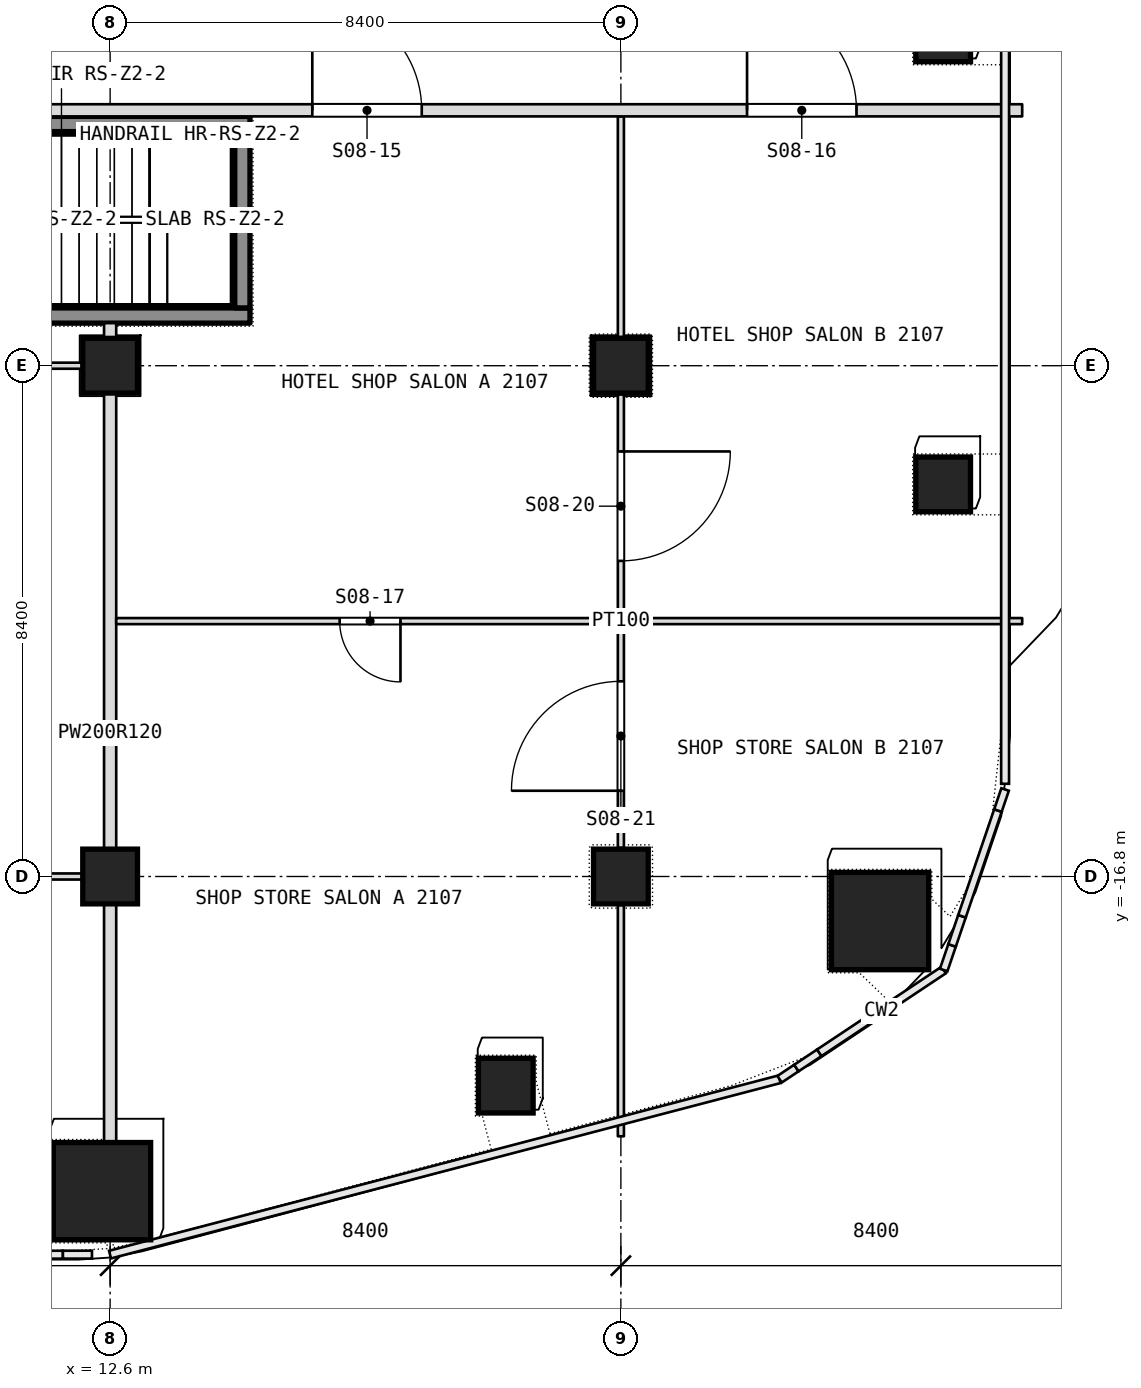
"""IFC4 building model, lengths in metres.
Left out: names, types, materials, properties, quantities, classifications, styles, units other than length and angle.
Written with IfcOpenShell. Run it as: python <this file> out.ifc"""

import sys

from ifc_helpers import new_model, si_unit, direction, frame, frame_2d, origin, origin_2d, place, context, subcontext, project, spatial, rectangle, extrude, element, fill, save


model = new_model("IFC4")
c1 = context("Model", 3, precision=1e-05, world=origin(), true_north=direction((0.0, 1.0)))
c2 = subcontext(c1, "Body", "Model", "MODEL_VIEW")
j1 = project(units=[si_unit("LENGTHUNIT", "METRE"), si_unit("PLANEANGLEUNIT", "RADIAN")], contexts=[c1])
p1 = place(None, origin())
s1 = spatial("IfcSite", under=j1, at=p1, CompositionType="ELEMENT")
p2 = place(p1, origin())
s2 = spatial("IfcBuilding", under=s1, at=p2, CompositionType="ELEMENT")
p3 = place(p2, frame((0.0, 0.0, 97.7)))
s3 = spatial("IfcBuildingStorey", under=s2, at=p3, CompositionType="ELEMENT", Elevation=97.7)
for number, where, z_axis, x_axis in (
    (1, (12.466, -21.975, 0.0), (0.0, 0.0, 1.0), (1.0, 0.0, 0.0)),
    (2, (25.263, -17.533, 0.0), (0.0, 0.0, 1.0), (1.0, 0.0, 0.0)),
):
    element("IfcColumn", number, at=place(p3, frame(where, z_axis=z_axis, x_axis=x_axis)), inside=s3, PredefinedType="COLUMN", context=c2, shape_type="SweptSolid", body=[
        extrude(rectangle(XDim=1.6, YDim=1.6, at=origin_2d()), origin(), (0.0, 0.0, 1.0), 7.2),
    ])
p4 = place(p3, frame((12.6, -16.8, -0.26), z_axis=(0.0, 0.0, 1.0), x_axis=(1.0, 0.0, 0.0)))
e3 = element("IfcColumn", 3, at=p4, inside=s3, PredefinedType="COLUMN", context=c2, shape_type="SweptSolid", body=[
    extrude(rectangle(XDim=0.9, YDim=0.9, at=origin_2d()), origin(), (0.0, 0.0, 1.0), 7.46),
])
p5 = place(p3, frame((12.6, -8.4, 0.0), z_axis=(0.0, 0.0, 1.0), x_axis=(1.0, 0.0, 0.0)))
e4 = element("IfcColumn", 4, at=p5, inside=s3, PredefinedType="COLUMN", context=c2, shape_type="SweptSolid", body=[
    extrude(rectangle(XDim=0.9, YDim=0.9, at=origin_2d()), origin(), (0.0, 0.0, 1.0), 7.2),
])
p6 = place(p3, frame((21.0, -16.8, -0.26), z_axis=(0.0, 0.0, 1.0), x_axis=(1.0, 0.0, 0.0)))
e5 = element("IfcColumn", 5, at=p6, inside=s3, PredefinedType="COLUMN", context=c2, shape_type="SweptSolid", body=[
    extrude(rectangle(XDim=0.9, YDim=0.9, at=origin_2d()), origin(), (0.0, 0.0, 1.0), 7.46),
])
for number, where, z_axis, x_axis in (
    (6, (21.0, -8.4, 0.0), (0.0, 0.0, 1.0), (1.0, 0.0, 0.0)),
    (7, (26.3, -2.951, 0.0), (0.0, 0.0, 1.0), (1.0, 0.0, 0.0)),
    (8, (26.3, -10.352, 0.0), (0.0, 0.0, 1.0), (1.0, 0.0, 0.0)),
    (9, (19.107, -20.239, 0.0), (0.0, 0.0, 1.0), (1.0, 0.0, 0.0)),
):
    element("IfcColumn", number, at=place(p3, frame(where, z_axis=z_axis, x_axis=x_axis)), inside=s3, PredefinedType="COLUMN", context=c2, shape_type="SweptSolid", body=[
        extrude(rectangle(XDim=0.9, YDim=0.9, at=origin_2d()), origin(), (0.0, 0.0, 1.0), 7.2),
    ])
p7 = place(p3, frame((21.0, -21.072, 0.0), z_axis=(0.0, 0.0, 1.0), x_axis=(0.0, 1.0, 0.0)))
e10 = element("IfcWall", 10, at=p7, inside=s3, PredefinedType="PARTITIONING", context=c2, shape_type="SweptSolid", body=[
    extrude(rectangle(XDim=3.802, YDim=0.1, at=frame_2d((1.901, 0.0))), origin(), (0.0, 0.0, 1.0), 6.94),
])
p8 = place(p3, frame((21.0, -16.33, 0.0), z_axis=(0.0, 0.0, 1.0), x_axis=(0.0, 1.0, 0.0)))
e11 = element("IfcWall", 11, at=p8, inside=s3, PredefinedType="PARTITIONING", context=c2, shape_type="SweptSolid", body=[
    extrude(rectangle(XDim=7.46, YDim=0.1, at=frame_2d((3.73, 0.0))), origin(), (0.0, 0.0, 1.0), 6.94),
])
p9 = place(p8, frame((4.72, 0.0, 0.0)))
e12 = element("IfcOpeningElement", 12, at=p9, cuts=e11, PredefinedType="OPENING", context=c2, shape_type="SweptSolid", body=[
    extrude(rectangle(XDim=1.8, YDim=2.1, at=frame_2d((0.9, 1.05))), frame((0.0, 0.05, 0.0), z_axis=(0.0, -1.0, 0.0), x_axis=(1.0, 0.0, 0.0)), (0.0, 0.0, 1.0), 0.1),
])
p10 = place(p8, frame((0.94, 0.0, 0.0)))
e13 = element("IfcOpeningElement", 13, at=p10, cuts=e11, PredefinedType="OPENING", context=c2, shape_type="SweptSolid", body=[
    extrude(rectangle(XDim=1.8, YDim=2.1, at=frame_2d((0.9, 1.05))), frame((0.0, 0.05, 0.0), z_axis=(0.0, -1.0, 0.0), x_axis=(1.0, 0.0, 0.0)), (0.0, 0.0, 1.0), 0.1),
])
p11 = place(p3, frame((21.0, -7.93, 0.0), z_axis=(0.0, 0.0, 1.0), x_axis=(0.0, 1.0, 0.0)))
e14 = element("IfcWall", 14, at=p11, inside=s3, PredefinedType="PARTITIONING", context=c2, shape_type="SweptSolid", body=[
    extrude(rectangle(XDim=3.63, YDim=0.1, at=frame_2d((1.815, 0.0))), origin(), (0.0, 0.0, 1.0), 6.94),
])
p12 = place(p3, frame((-24.463, -16.8, 0.0), z_axis=(0.0, 0.0, 1.0), x_axis=(1.0, 0.0, 0.0)))
e15 = element("IfcWall", 15, at=p12, inside=s3, PredefinedType="PARTITIONING", context=c2, shape_type="SweptSolid", body=[
    extrude(rectangle(XDim=37.163, YDim=0.1, at=frame_2d((18.582, 0.0))), origin(), (0.0, 0.0, 1.0), 6.49),
])
p13 = place(p12, frame((7.038, 0.0, 0.0)))
e16 = element("IfcOpeningElement", 16, at=p13, cuts=e15, PredefinedType="OPENING", context=c2, shape_type="SweptSolid", body=[
    extrude(rectangle(XDim=1.2, YDim=2.1, at=frame_2d((0.6, 1.05))), frame((0.0, 0.05, 0.0), z_axis=(0.0, -1.0, 0.0), x_axis=(1.0, 0.0, 0.0)), (0.0, 0.0, 1.0), 0.1),
])
p14 = place(p12, frame((24.063, 0.0, 0.0)))
e17 = element("IfcOpeningElement", 17, at=p14, cuts=e15, PredefinedType="OPENING", context=c2, shape_type="SweptSolid", body=[
    extrude(rectangle(XDim=1.0, YDim=2.1, at=frame_2d((0.5, 1.05))), frame((0.0, 0.05, 0.0), z_axis=(0.0, -1.0, 0.0), x_axis=(1.0, 0.0, 0.0)), (0.0, 0.0, 1.0), 0.1),
])
p15 = place(p3, frame((12.6, -21.175, 0.0), z_axis=(0.0, 0.0, 1.0), x_axis=(0.0, 1.0, 0.0)))
e18 = element("IfcWall", 18, at=p15, inside=s3, PredefinedType="PARTITIONING", context=c2, shape_type="SweptSolid", body=[
    extrude(rectangle(XDim=13.475, YDim=0.2, at=frame_2d((6.738, 0.0))), origin(), (0.0, 0.0, 1.0), 6.94),
])
p16 = place(p3, frame((12.7, -12.6, 0.0), z_axis=(0.0, 0.0, 1.0), x_axis=(1.0, 0.0, 0.0)))
e19 = element("IfcWall", 19, at=p16, inside=s3, PredefinedType="PARTITIONING", context=c2, shape_type="SweptSolid", body=[
    extrude(rectangle(XDim=14.9, YDim=0.1, at=frame_2d((7.45, 0.0))), origin(), (0.0, 0.0, 1.0), 6.94),
])
p17 = place(p16, frame((3.675, 0.0, 0.0)))
e20 = element("IfcOpeningElement", 20, at=p17, cuts=e19, PredefinedType="OPENING", context=c2, shape_type="SweptSolid", body=[
    extrude(rectangle(XDim=1.0, YDim=2.1, at=frame_2d((0.5, 1.05))), frame((0.0, 0.05, 0.0), z_axis=(0.0, -1.0, 0.0), x_axis=(1.0, 0.0, 0.0)), (0.0, 0.0, 1.0), 0.1),
])
p18 = place(p3, frame((4.67, -8.4, 0.0), z_axis=(0.0, 0.0, 1.0), x_axis=(1.0, 0.0, 0.0)))
e21 = element("IfcWall", 21, at=p18, inside=s3, PredefinedType="PARTITIONING", context=c2, shape_type="SweptSolid", body=[
    extrude(rectangle(XDim=7.83, YDim=0.1, at=frame_2d((3.915, 0.0))), origin(), (0.0, 0.0, 1.0), 6.49),
])
p19 = place(p3, frame((-27.6, -4.2, 0.0), z_axis=(0.0, 0.0, 1.0), x_axis=(1.0, 0.0, 0.0)))
e22 = element("IfcWall", 22, at=p19, inside=s3, PredefinedType="PARTITIONING", context=c2, shape_type="SweptSolid", body=[
    extrude(rectangle(XDim=55.2, YDim=0.2, at=frame_2d((27.6, 0.0))), origin(), (0.0, 0.0, 1.0), 6.94),
])
p20 = place(p19, frame((9.925, 0.0, 0.0)))
e23 = element("IfcOpeningElement", 23, at=p20, cuts=e22, PredefinedType="OPENING", context=c2, shape_type="SweptSolid", body=[
    extrude(rectangle(XDim=1.8, YDim=2.1, at=frame_2d((0.9, 1.05))), frame((0.0, 0.1, 0.0), z_axis=(0.0, -1.0, 0.0), x_axis=(1.0, 0.0, 0.0)), (0.0, 0.0, 1.0), 0.2),
])
p21 = place(p19, frame((2.725, 0.0, 0.0)))
e24 = element("IfcOpeningElement", 24, at=p21, cuts=e22, PredefinedType="OPENING", context=c2, shape_type="SweptSolid", body=[
    extrude(rectangle(XDim=1.8, YDim=2.1, at=frame_2d((0.9, 1.05))), frame((0.0, 0.1, 0.0), z_axis=(0.0, -1.0, 0.0), x_axis=(1.0, 0.0, 0.0)), (0.0, 0.0, 1.0), 0.2),
])
p22 = place(p19, frame((26.65, 0.0, 0.0)))
e25 = element("IfcOpeningElement", 25, at=p22, cuts=e22, PredefinedType="OPENING", context=c2, shape_type="SweptSolid", body=[
    extrude(rectangle(XDim=1.8, YDim=2.1, at=frame_2d((0.9, 1.05))), frame((0.0, 0.1, 0.0), z_axis=(0.0, -1.0, 0.0), x_axis=(1.0, 0.0, 0.0)), (0.0, 0.0, 1.0), 0.2),
])
p23 = place(p19, frame((43.525, 0.0, 0.0)))
e26 = element("IfcOpeningElement", 26, at=p23, cuts=e22, PredefinedType="OPENING", context=c2, shape_type="SweptSolid", body=[
    extrude(rectangle(XDim=1.8, YDim=2.1, at=frame_2d((0.9, 1.05))), frame((0.0, 0.1, 0.0), z_axis=(0.0, -1.0, 0.0), x_axis=(1.0, 0.0, 0.0)), (0.0, 0.0, 1.0), 0.2),
])
p24 = place(p19, frame((50.675, 0.0, 0.0)))
e27 = element("IfcOpeningElement", 27, at=p24, cuts=e22, PredefinedType="OPENING", context=c2, shape_type="SweptSolid", body=[
    extrude(rectangle(XDim=1.8, YDim=2.1, at=frame_2d((0.9, 1.05))), frame((0.0, 0.1, 0.0), z_axis=(0.0, -1.0, 0.0), x_axis=(1.0, 0.0, 0.0)), (0.0, 0.0, 1.0), 0.2),
])
for number, where, z_axis, x_axis in (
    (28, (8.7, -7.575, -0.26), (0.0, 0.0, 1.0), (1.0, 0.0, 0.0)),
    (29, (8.7, -4.425, -0.26), (0.0, 0.0, 1.0), (1.0, 0.0, 0.0)),
):
    element("IfcWall", number, at=place(p3, frame(where, z_axis=z_axis, x_axis=x_axis)), inside=s3, PredefinedType="SHEAR", context=c2, shape_type="SweptSolid", body=[
        extrude(rectangle(XDim=6.2, YDim=0.25, at=frame_2d((3.1, 0.0))), origin(), (0.0, 0.0, 1.0), 7.56),
    ])
p25 = place(p3, frame((14.775, -7.45, -0.26), z_axis=(0.0, 0.0, 1.0), x_axis=(0.0, 1.0, 0.0)))
e30 = element("IfcWall", 30, at=p25, inside=s3, PredefinedType="SHEAR", context=c2, shape_type="SweptSolid", body=[
    extrude(rectangle(XDim=2.9, YDim=0.25, at=frame_2d((1.45, 0.0))), origin(), (0.0, 0.0, 1.0), 7.56),
])
p26 = place(p9, origin())
e31 = element("IfcDoor", 31, at=p26, inside=s3, OperationType="DOUBLE_DOOR_SINGLE_SWING", PredefinedType="DOOR", context=c2, shape_type="SweptSolid", body=[
    extrude(rectangle(XDim=1.8, YDim=2.1, at=frame_2d((0.9, 1.05))), frame((0.0, 0.025, 0.0), z_axis=(0.0, -1.0, 0.0), x_axis=(1.0, 0.0, 0.0)), (0.0, 0.0, 1.0), 0.05),
])
fill(e12, e31)
p27 = place(p10, origin())
e32 = element("IfcDoor", 32, at=p27, inside=s3, OperationType="DOUBLE_DOOR_SINGLE_SWING", PredefinedType="DOOR", context=c2, shape_type="SweptSolid", body=[
    extrude(rectangle(XDim=1.8, YDim=2.1, at=frame_2d((0.9, 1.05))), frame((0.0, 0.025, 0.0), z_axis=(0.0, -1.0, 0.0), x_axis=(1.0, 0.0, 0.0)), (0.0, 0.0, 1.0), 0.05),
])
fill(e13, e32)
p28 = place(p17, origin())
e33 = element("IfcDoor", 33, at=p28, inside=s3, OperationType="SINGLE_SWING_LEFT", PredefinedType="DOOR", context=c2, shape_type="SweptSolid", body=[
    extrude(rectangle(XDim=1.0, YDim=2.1, at=frame_2d((0.5, 1.05))), frame((0.0, 0.025, 0.0), z_axis=(0.0, -1.0, 0.0), x_axis=(1.0, 0.0, 0.0)), (0.0, 0.0, 1.0), 0.05),
])
fill(e20, e33)
p29 = place(p23, origin())
e34 = element("IfcDoor", 34, at=p29, inside=s3, OperationType="DOUBLE_DOOR_SINGLE_SWING", PredefinedType="DOOR", context=c2, shape_type="SweptSolid", body=[
    extrude(rectangle(XDim=1.8, YDim=2.1, at=frame_2d((0.9, 1.05))), frame((0.0, 0.025, 0.0), z_axis=(0.0, -1.0, 0.0), x_axis=(1.0, 0.0, 0.0)), (0.0, 0.0, 1.0), 0.05),
])
fill(e26, e34)
p30 = place(p24, origin())
e35 = element("IfcDoor", 35, at=p30, inside=s3, OperationType="DOUBLE_DOOR_SINGLE_SWING", PredefinedType="DOOR", context=c2, shape_type="SweptSolid", body=[
    extrude(rectangle(XDim=1.8, YDim=2.1, at=frame_2d((0.9, 1.05))), frame((0.0, 0.025, 0.0), z_axis=(0.0, -1.0, 0.0), x_axis=(1.0, 0.0, 0.0)), (0.0, 0.0, 1.0), 0.05),
])
fill(e27, e35)
save(model, sys.argv[1])
